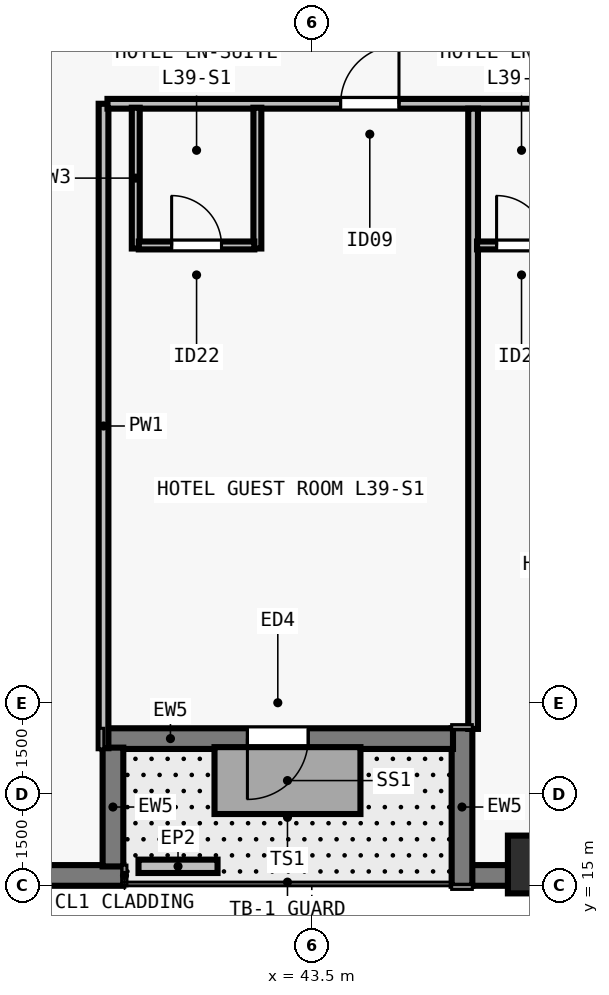
"""IFC4 building model, lengths in metres.
Left out: names, types, materials, properties, quantities, classifications, styles, units other than length and angle.
Written with IfcOpenShell. Run it as: python <this file> out.ifc"""

import sys

from ifc_helpers import new_model, si_unit, direction, frame, frame_2d, origin, origin_2d, place, context, subcontext, project, spatial, rectangle, extrude, element, fill, save


model = new_model("IFC4")
c1 = context("Model", 3, precision=1e-05, world=origin(), true_north=direction((0.0, 1.0)))
c2 = subcontext(c1, "Body", "Model", "MODEL_VIEW")
j1 = project(units=[si_unit("LENGTHUNIT", "METRE"), si_unit("PLANEANGLEUNIT", "RADIAN")], contexts=[c1])
p1 = place(None, origin())
s1 = spatial("IfcSite", under=j1, at=p1, CompositionType="ELEMENT")
p2 = place(p1, origin())
s2 = spatial("IfcBuilding", under=s1, at=p2, CompositionType="ELEMENT")
p3 = place(p2, frame((0.0, 0.0, 144.5)))
s3 = spatial("IfcBuildingStorey", under=s2, at=p3, CompositionType="ELEMENT", Elevation=144.5)
p4 = place(p3, frame((47.2, 15.35, 0.0), z_axis=(0.0, 0.0, 1.0), x_axis=(1.0, 0.0, 0.0)))
e1 = element("IfcColumn", 1, at=p4, inside=s3, PredefinedType="COLUMN", context=c2, shape_type="SweptSolid", body=[
    extrude(rectangle(XDim=0.95, YDim=0.95, at=origin_2d()), origin(), (0.0, 0.0, 1.0), 3.5),
])
p5 = place(p3, frame((40.4, 15.17, 0.0), z_axis=(0.0, 0.0, 1.0), x_axis=(-1.0, 0.0, 0.0)))
e2 = element("IfcWall", 2, at=p5, inside=s3, PredefinedType="SOLIDWALL", context=c2, shape_type="SweptSolid", body=[
    extrude(rectangle(XDim=8.082, YDim=0.34, at=frame_2d((4.041, 0.0))), origin(), (0.0, 0.0, 1.0), 3.28),
])
p6 = place(p3, frame((72.0, 15.17, 0.0), z_axis=(0.0, 0.0, 1.0), x_axis=(-1.0, 0.0, 0.0)))
e3 = element("IfcWall", 3, at=p6, inside=s3, PredefinedType="SOLIDWALL", context=c2, shape_type="SweptSolid", body=[
    extrude(rectangle(XDim=25.882, YDim=0.34, at=frame_2d((12.941, 0.0))), origin(), (0.0, 0.0, 1.0), 3.28),
])
p7 = place(p6, frame((12.066, 0.0, 0.8)))
e4 = element("IfcOpeningElement", 4, at=p7, cuts=e3, PredefinedType="OPENING", context=c2, shape_type="SweptSolid", body=[
    extrude(rectangle(XDim=1.75, YDim=1.66, at=frame_2d((0.875, 0.83))), frame((0.0, 0.18, 0.0), z_axis=(0.0, -1.0, 0.0), x_axis=(1.0, 0.0, 0.0)), (0.0, 0.0, 1.0), 0.36),
])
p8 = place(p6, frame((15.902, 0.0, 0.8)))
e5 = element("IfcOpeningElement", 5, at=p8, cuts=e3, PredefinedType="OPENING", context=c2, shape_type="SweptSolid", body=[
    extrude(rectangle(XDim=1.35, YDim=1.66, at=frame_2d((0.675, 0.83))), frame((0.0, 0.18, 0.0), z_axis=(0.0, -1.0, 0.0), x_axis=(1.0, 0.0, 0.0)), (0.0, 0.0, 1.0), 0.36),
])
p9 = place(p6, frame((18.889, 0.0, 0.8)))
e6 = element("IfcOpeningElement", 6, at=p9, cuts=e3, PredefinedType="OPENING", context=c2, shape_type="SweptSolid", body=[
    extrude(rectangle(XDim=1.75, YDim=1.66, at=frame_2d((0.875, 0.83))), frame((0.0, 0.18, 0.0), z_axis=(0.0, -1.0, 0.0), x_axis=(1.0, 0.0, 0.0)), (0.0, 0.0, 1.0), 0.36),
])
p10 = place(p6, frame((21.59, 0.0, 0.8)))
e7 = element("IfcOpeningElement", 7, at=p10, cuts=e3, PredefinedType="OPENING", context=c2, shape_type="SweptSolid", body=[
    extrude(rectangle(XDim=0.9, YDim=1.66, at=frame_2d((0.45, 0.83))), frame((0.0, 0.18, 0.0), z_axis=(0.0, -1.0, 0.0), x_axis=(1.0, 0.0, 0.0)), (0.0, 0.0, 1.0), 0.36),
])
p11 = place(p3, frame((45.97, 15.0, 0.0), z_axis=(0.0, 0.0, 1.0), x_axis=(0.0, 1.0, 0.0)))
e8 = element("IfcWall", 8, at=p11, inside=s3, PredefinedType="SOLIDWALL", context=c2, shape_type="SweptSolid", body=[
    extrude(rectangle(XDim=2.59, YDim=0.34, at=frame_2d((1.295, 0.0))), origin(), (0.0, 0.0, 1.0), 3.28),
])
p12 = place(p3, frame((45.822, 17.42, 0.0), z_axis=(0.0, 0.0, 1.0), x_axis=(-1.0, 0.0, 0.0)))
e9 = element("IfcWall", 9, at=p12, inside=s3, PredefinedType="SOLIDWALL", context=c2, shape_type="SweptSolid", body=[
    extrude(rectangle(XDim=5.762, YDim=0.34, at=frame_2d((2.881, 0.0))), origin(), (0.0, 0.0, 1.0), 3.28),
])
p13 = place(p12, frame((2.381, 0.0, 0.0)))
e10 = element("IfcOpeningElement", 10, at=p13, cuts=e9, PredefinedType="OPENING", context=c2, shape_type="SweptSolid", body=[
    extrude(rectangle(XDim=1.0, YDim=2.15, at=frame_2d((0.5, 1.075))), frame((0.0, 0.18, 0.0), z_axis=(0.0, -1.0, 0.0), x_axis=(1.0, 0.0, 0.0)), (0.0, 0.0, 1.0), 0.36),
])
p14 = place(p3, frame((40.23, 17.272, 0.0), z_axis=(0.0, 0.0, 1.0), x_axis=(0.0, -1.0, 0.0)))
e11 = element("IfcWall", 11, at=p14, inside=s3, PredefinedType="SOLIDWALL", context=c2, shape_type="SweptSolid", body=[
    extrude(rectangle(XDim=1.954, YDim=0.34, at=frame_2d((0.977, 0.0))), origin(), (0.0, 0.0, 1.0), 3.28),
])
p15 = place(p3, frame((40.65, 15.32, 0.0), z_axis=(0.0, 0.0, 1.0), x_axis=(1.0, 0.0, 0.0)))
e12 = element("IfcWall", 12, at=p15, inside=s3, PredefinedType="PARAPET", context=c2, shape_type="SweptSolid", body=[
    extrude(rectangle(XDim=1.3, YDim=0.22, at=frame_2d((0.65, 0.0))), origin(), (0.0, 0.0, 1.0), 0.55),
])
p16 = place(p3, frame((40.075, 17.262, 0.0), z_axis=(0.0, 0.0, 1.0), x_axis=(0.0, 1.0, 0.0)))
e13 = element("IfcWall", 13, at=p16, inside=s3, PredefinedType="PARTITIONING", context=c2, shape_type="SweptSolid", body=[
    extrude(rectangle(XDim=10.598, YDim=0.16, at=frame_2d((5.299, 0.0))), origin(), (0.0, 0.0, 1.0), 2.555),
])
p17 = place(p3, frame((40.14, 27.86, 0.0), z_axis=(0.0, 0.0, 1.0), x_axis=(1.0, 0.0, 0.0)))
e14 = element("IfcWall", 14, at=p17, inside=s3, PredefinedType="PARTITIONING", context=c2, shape_type="SweptSolid", body=[
    extrude(rectangle(XDim=22.07, YDim=0.16, at=frame_2d((11.035, 0.0))), origin(), (0.0, 0.0, 1.0), 3.28),
])
p18 = place(p17, frame((3.834, 0.0, 0.0)))
e15 = element("IfcOpeningElement", 15, at=p18, cuts=e14, PredefinedType="OPENING", context=c2, shape_type="SweptSolid", body=[
    extrude(rectangle(XDim=0.96, YDim=2.15, at=frame_2d((0.48, 1.075))), frame((0.0, 0.09, 0.0), z_axis=(0.0, -1.0, 0.0), x_axis=(1.0, 0.0, 0.0)), (0.0, 0.0, 1.0), 0.18),
])
p19 = place(p17, frame((8.746, 0.0, 0.0)))
e16 = element("IfcOpeningElement", 16, at=p19, cuts=e14, PredefinedType="OPENING", context=c2, shape_type="SweptSolid", body=[
    extrude(rectangle(XDim=0.96, YDim=2.15, at=frame_2d((0.48, 1.075))), frame((0.0, 0.09, 0.0), z_axis=(0.0, -1.0, 0.0), x_axis=(1.0, 0.0, 0.0)), (0.0, 0.0, 1.0), 0.18),
])
p20 = place(p17, frame((14.46, 0.0, 0.0)))
e17 = element("IfcOpeningElement", 17, at=p20, cuts=e14, PredefinedType="OPENING", context=c2, shape_type="SweptSolid", body=[
    extrude(rectangle(XDim=0.96, YDim=2.15, at=frame_2d((0.48, 1.075))), frame((0.0, 0.09, 0.0), z_axis=(0.0, -1.0, 0.0), x_axis=(1.0, 0.0, 0.0)), (0.0, 0.0, 1.0), 0.18),
])
p21 = place(p17, frame((19.993, 0.0, 0.0)))
e18 = element("IfcOpeningElement", 18, at=p21, cuts=e14, PredefinedType="OPENING", context=c2, shape_type="SweptSolid", body=[
    extrude(rectangle(XDim=0.96, YDim=2.15, at=frame_2d((0.48, 1.075))), frame((0.0, 0.09, 0.0), z_axis=(0.0, -1.0, 0.0), x_axis=(1.0, 0.0, 0.0)), (0.0, 0.0, 1.0), 0.18),
])
p22 = place(p3, frame((40.605, 25.48, 0.0), z_axis=(0.0, 0.0, 1.0), x_axis=(0.0, 1.0, 0.0)))
e19 = element("IfcWall", 19, at=p22, inside=s3, PredefinedType="PLUMBINGWALL", context=c2, shape_type="SweptSolid", body=[
    extrude(rectangle(XDim=2.315, YDim=0.13, at=frame_2d((1.157, 0.0))), origin(), (0.0, 0.0, 1.0), 2.555),
])
p23 = place(p3, frame((42.605, 25.48, 0.0), z_axis=(0.0, 0.0, 1.0), x_axis=(0.0, 1.0, 0.0)))
e20 = element("IfcWall", 20, at=p23, inside=s3, PredefinedType="PLUMBINGWALL", context=c2, shape_type="SweptSolid", body=[
    extrude(rectangle(XDim=2.315, YDim=0.13, at=frame_2d((1.157, 0.0))), origin(), (0.0, 0.0, 1.0), 3.28),
])
p24 = place(p3, frame((40.655, 25.53, 0.0), z_axis=(0.0, 0.0, 1.0), x_axis=(1.0, 0.0, 0.0)))
e21 = element("IfcWall", 21, at=p24, inside=s3, PredefinedType="PLUMBINGWALL", context=c2, shape_type="SweptSolid", body=[
    extrude(rectangle(XDim=1.9, YDim=0.13, at=frame_2d((0.95, 0.0))), origin(), (0.0, 0.0, 1.0), 3.28),
])
p25 = place(p24, frame((0.54, 0.0, 0.0)))
e22 = element("IfcOpeningElement", 22, at=p25, cuts=e21, PredefinedType="OPENING", context=c2, shape_type="SweptSolid", body=[
    extrude(rectangle(XDim=0.82, YDim=2.1, at=frame_2d((0.41, 1.05))), frame((0.0, 0.075, 0.0), z_axis=(0.0, -1.0, 0.0), x_axis=(1.0, 0.0, 0.0)), (0.0, 0.0, 1.0), 0.15),
])
p26 = place(p3, frame((46.153, 17.58, 0.0), z_axis=(0.0, 0.0, 1.0), x_axis=(0.0, 1.0, 0.0)))
e23 = element("IfcWall", 23, at=p26, inside=s3, PredefinedType="PARTITIONING", context=c2, shape_type="SweptSolid", body=[
    extrude(rectangle(XDim=10.2, YDim=0.16, at=frame_2d((5.1, 0.0))), origin(), (0.0, 0.0, 1.0), 3.28),
])
p27 = place(p3, frame((46.218, 25.53, 0.0), z_axis=(0.0, 0.0, 1.0), x_axis=(1.0, 0.0, 0.0)))
e24 = element("IfcWall", 24, at=p27, inside=s3, PredefinedType="PLUMBINGWALL", context=c2, shape_type="SweptSolid", body=[
    extrude(rectangle(XDim=1.478, YDim=0.13, at=frame_2d((0.739, 0.0))), origin(), (0.0, 0.0, 1.0), 3.28),
])
p28 = place(p27, frame((0.321, 0.0, 0.0)))
e25 = element("IfcOpeningElement", 25, at=p28, cuts=e24, PredefinedType="OPENING", context=c2, shape_type="SweptSolid", body=[
    extrude(rectangle(XDim=0.82, YDim=2.1, at=frame_2d((0.41, 1.05))), frame((0.0, 0.075, 0.0), z_axis=(0.0, -1.0, 0.0), x_axis=(1.0, 0.0, 0.0)), (0.0, 0.0, 1.0), 0.15),
])
p29 = place(p13, origin())
e26 = element("IfcDoor", 26, at=p29, inside=s3, OperationType="SINGLE_SWING_RIGHT", PredefinedType="DOOR", context=c2, shape_type="SweptSolid", body=[
    extrude(rectangle(XDim=1.0, YDim=2.15, at=frame_2d((0.5, 1.075))), frame((0.0, 0.025, 0.0), z_axis=(0.0, -1.0, 0.0), x_axis=(1.0, 0.0, 0.0)), (0.0, 0.0, 1.0), 0.05),
])
fill(e10, e26)
p30 = place(p25, origin())
e27 = element("IfcDoor", 27, at=p30, inside=s3, OperationType="SINGLE_SWING_LEFT", PredefinedType="DOOR", context=c2, shape_type="SweptSolid", body=[
    extrude(rectangle(XDim=0.82, YDim=2.1, at=frame_2d((0.41, 1.05))), frame((0.0, 0.025, 0.0), z_axis=(0.0, -1.0, 0.0), x_axis=(1.0, 0.0, 0.0)), (0.0, 0.0, 1.0), 0.05),
])
fill(e22, e27)
p31 = place(p18, origin())
e28 = element("IfcDoor", 28, at=p31, inside=s3, OperationType="SINGLE_SWING_RIGHT", PredefinedType="DOOR", context=c2, shape_type="SweptSolid", body=[
    extrude(rectangle(XDim=0.96, YDim=2.15, at=frame_2d((0.48, 1.075))), frame((0.0, 0.025, 0.0), z_axis=(0.0, -1.0, 0.0), x_axis=(1.0, 0.0, 0.0)), (0.0, 0.0, 1.0), 0.05),
])
fill(e15, e28)
p32 = place(p28, origin())
e29 = element("IfcDoor", 29, at=p32, inside=s3, OperationType="SINGLE_SWING_LEFT", PredefinedType="DOOR", context=c2, shape_type="SweptSolid", body=[
    extrude(rectangle(XDim=0.82, YDim=2.1, at=frame_2d((0.41, 1.05))), frame((0.0, 0.025, 0.0), z_axis=(0.0, -1.0, 0.0), x_axis=(1.0, 0.0, 0.0)), (0.0, 0.0, 1.0), 0.05),
])
fill(e25, e29)
save(model, sys.argv[1])
